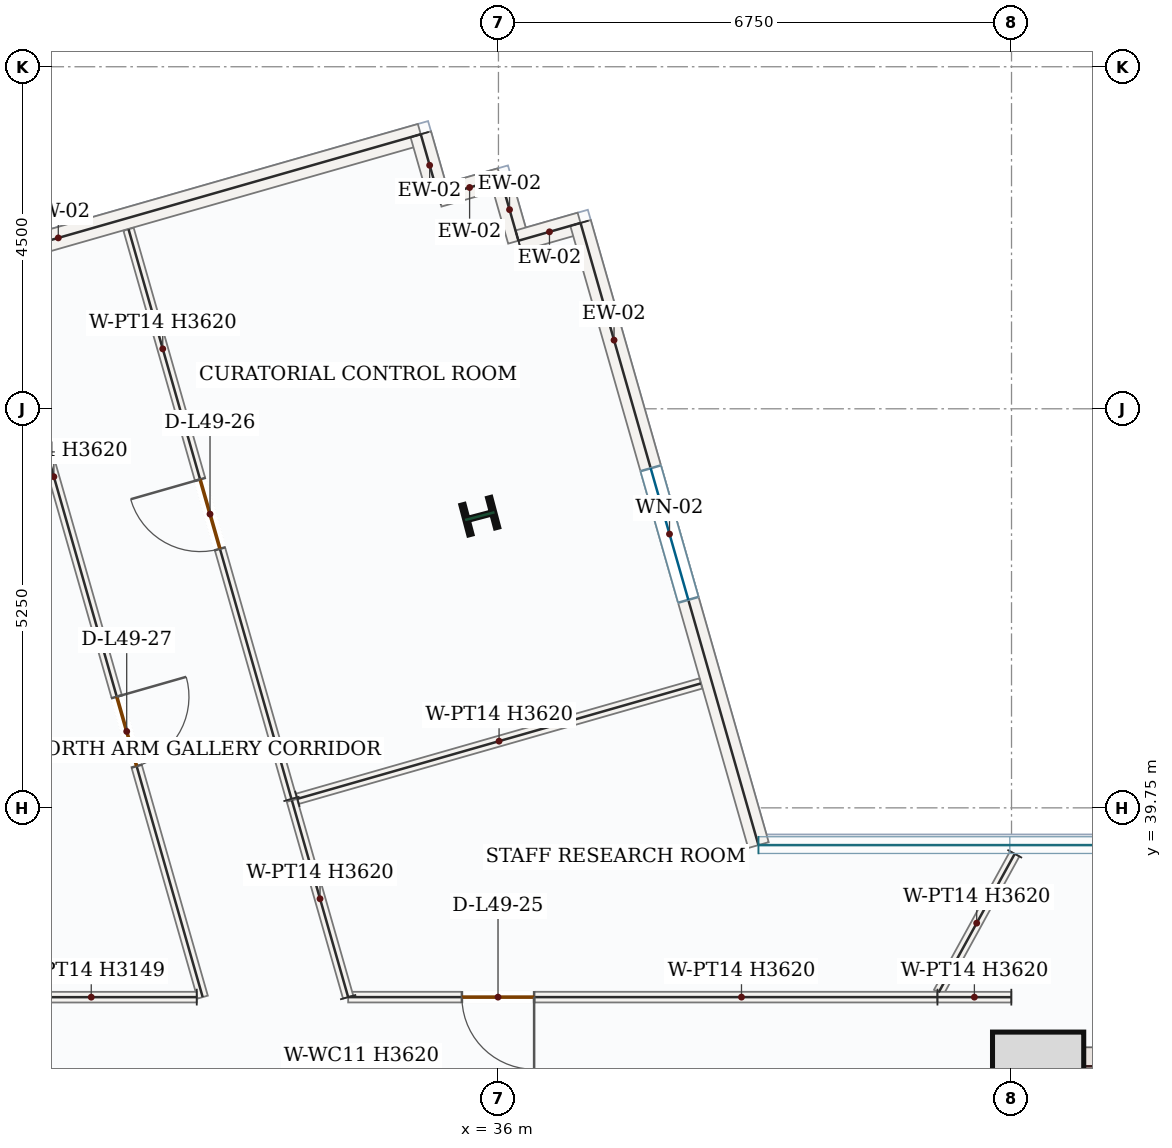
"""IFC4 building model, lengths in metres.
Left out: names, types, materials, properties, quantities, classifications, styles, units other than length and angle.
Written with IfcOpenShell. Run it as: python <this file> out.ifc"""

import sys

from ifc_helpers import new_model, si_unit, direction, frame, frame_2d, origin, origin_2d, place, context, subcontext, project, spatial, rectangle, i_section, extrude, source, transform, mapped, element, fill, save


model = new_model("IFC4")
c1 = context("Model", 3, precision=1e-05, world=origin(), true_north=direction((0.0, 1.0)))
c2 = subcontext(c1, "Body", "Model", "MODEL_VIEW")
j1 = project(units=[si_unit("LENGTHUNIT", "METRE"), si_unit("PLANEANGLEUNIT", "RADIAN")], contexts=[c1])
p1 = place(None, origin())
s1 = spatial("IfcSite", under=j1, at=p1, CompositionType="ELEMENT")
p2 = place(p1, origin())
s2 = spatial("IfcBuilding", under=s1, at=p2, CompositionType="ELEMENT")
p3 = place(p2, frame((0.0, 0.0, 209.7)))
s3 = spatial("IfcBuildingStorey", under=s2, at=p3, CompositionType="ELEMENT", Elevation=209.7)
p4 = place(p3, frame((43.0, 28.05, 0.0), z_axis=(0.0, 0.0, 1.0), x_axis=(0.0, 1.0, 0.0)))
e1 = element("IfcWall", 1, at=p4, inside=s3, PredefinedType="SHEAR", context=c2, shape_type="SweptSolid", body=[
    extrude(rectangle(XDim=8.55, YDim=0.5, at=frame_2d((4.275, 0.0))), origin(), (0.0, 0.0, 1.0), 3.62),
])
p5 = place(p4, frame((1.5, 0.0, 0.0)))
e2 = element("IfcOpeningElement", 2, at=p5, cuts=e1, PredefinedType="OPENING", context=c2, shape_type="SweptSolid", body=[
    extrude(rectangle(XDim=1.1, YDim=2.2, at=frame_2d((0.55, 1.1))), frame((0.0, 0.26, 0.0), z_axis=(0.0, -1.0, 0.0), x_axis=(1.0, 0.0, 0.0)), (0.0, 0.0, 1.0), 0.52),
])
m1 = source(origin(), c2, "Body", "SweptSolid", [
    extrude(rectangle(XDim=7.0, YDim=0.5, at=frame_2d((3.5, 0.0))), origin(), (0.0, 0.0, 1.0), 3.62),
])
p6 = place(p3, frame((43.25, 36.35, 0.0), z_axis=(0.0, 0.0, 1.0), x_axis=(1.0, 0.0, 0.0)))
e3 = element("IfcWall", 3, at=p6, inside=s3, PredefinedType="SHEAR", context=c2, shape_type="MappedRepresentation", body=[
    mapped(m1, transform((0.0, 0.0, 0.0), x_axis=(1.0, 0.0, 0.0), y_axis=(0.0, 1.0, 0.0), z_axis=(0.0, 0.0, 1.0), scale=1.0)),
])
m2 = source(origin(), c2, "Body", "SweptSolid", [
    extrude(rectangle(XDim=1.2, YDim=1.2, at=origin_2d()), origin(), (0.0, 0.0, 1.0), 3.9),
])
p7 = place(p3, frame((43.1, 36.2, 0.0), z_axis=(0.0, 0.0, 1.0), x_axis=(1.0, 0.0, 0.0)))
e4 = element("IfcColumn", 4, at=p7, inside=s3, PredefinedType="COLUMN", context=c2, shape_type="MappedRepresentation", body=[
    mapped(m2, transform((0.0, 0.0, 0.0), x_axis=(1.0, 0.0, 0.0), y_axis=(0.0, 1.0, 0.0), z_axis=(0.0, 0.0, 1.0), scale=1.0)),
])
m3 = source(origin(), c2, "Body", "SweptSolid", [
    extrude(i_section(OverallWidth=0.404, OverallDepth=0.407, WebThickness=0.027, FlangeThickness=0.044, FilletRadius=0.018, at=origin_2d()), origin(), (0.0, 0.0, 1.0), 3.9),
])
p8 = place(p3, frame((35.755, 43.588, 0.0), z_axis=(0.0, 0.0, 1.0), x_axis=(-0.255445757936, 0.966823388604, 0.0)))
e5 = element("IfcColumn", 5, at=p8, inside=s3, PredefinedType="COLUMN", context=c2, shape_type="MappedRepresentation", body=[
    mapped(m3, transform((0.0, 0.0, 0.0), x_axis=(1.0, 0.0, 0.0), y_axis=(0.0, 1.0, 0.0), z_axis=(0.0, 0.0, 1.0), scale=1.0)),
])
m4 = source(origin(), c2, "Body", "SweptSolid", [
    extrude(rectangle(XDim=9.92, YDim=0.28, at=frame_2d((4.96, 0.0))), origin(), (0.0, 0.0, 1.0), 3.62),
])
p9 = place(p3, frame((25.44, 45.885, 0.0), z_axis=(0.0, 0.0, 1.0), x_axis=(0.961457051276, 0.274955157346, 0.0)))
e6 = element("IfcWall", 6, at=p9, inside=s3, PredefinedType="SOLIDWALL", context=c2, shape_type="MappedRepresentation", body=[
    mapped(m4, transform((0.0, 0.0, 0.0), x_axis=(1.0, 0.0, 0.0), y_axis=(0.0, 1.0, 0.0), z_axis=(0.0, 0.0, 1.0), scale=1.0)),
])
m5 = source(origin(), c2, "Body", "SweptSolid", [
    extrude(rectangle(XDim=0.85, YDim=0.28, at=frame_2d((0.425, 0.0))), origin(), (0.0, 0.0, 1.0), 3.62),
])
for number, where, z_axis, x_axis in (
    (7, (34.978, 48.612, 0.0), (0.0, 0.0, 1.0), (0.275, -0.961, 0.0)),
    (8, (35.212, 47.795, 0.0), (0.0, 0.0, 1.0), (0.961, 0.275, 0.0)),
):
    element("IfcWall", number, at=place(p3, frame(where, z_axis=z_axis, x_axis=x_axis)), inside=s3, PredefinedType="SOLIDWALL", context=c2, shape_type="MappedRepresentation", body=[
        mapped(m5, transform((0.0, 0.0, 0.0), x_axis=(1.0, 0.0, 0.0), y_axis=(0.0, 1.0, 0.0), z_axis=(0.0, 0.0, 1.0), scale=1.0)),
    ])
m6 = source(origin(), c2, "Body", "SweptSolid", [
    extrude(rectangle(XDim=0.85, YDim=0.28, at=frame_2d((0.425, 0.0))), origin(), (0.0, 0.0, 1.0), 3.62),
])
p10 = place(p3, frame((36.029, 48.029, 0.0), z_axis=(0.0, 0.0, 1.0), x_axis=(0.274834915789, -0.961491429532, 0.0)))
e9 = element("IfcWall", 9, at=p10, inside=s3, PredefinedType="SOLIDWALL", context=c2, shape_type="MappedRepresentation", body=[
    mapped(m6, transform((0.0, 0.0, 0.0), x_axis=(1.0, 0.0, 0.0), y_axis=(0.0, 1.0, 0.0), z_axis=(0.0, 0.0, 1.0), scale=1.0)),
])
p11 = place(p3, frame((36.263, 47.211, 0.0), z_axis=(0.0, 0.0, 1.0), x_axis=(0.961393768724, 0.275176346112, 0.0)))
e10 = element("IfcWall", 10, at=p11, inside=s3, PredefinedType="SOLIDWALL", context=c2, shape_type="MappedRepresentation", body=[
    mapped(m5, transform((0.0, 0.0, 0.0), x_axis=(1.0, 0.0, 0.0), y_axis=(0.0, 1.0, 0.0), z_axis=(0.0, 0.0, 1.0), scale=1.0)),
])
p12 = place(p3, frame((37.08, 47.445, 0.0), z_axis=(0.0, 0.0, 1.0), x_axis=(0.27496352843, -0.961454657295, 0.0)))
e11 = element("IfcWall", 11, at=p12, inside=s3, PredefinedType="SOLIDWALL", context=c2, shape_type="SweptSolid", body=[
    extrude(rectangle(XDim=8.513, YDim=0.28, at=frame_2d((4.257, 0.0))), origin(), (0.0, 0.0, 1.0), 3.62),
])
p13 = place(p12, frame((3.357, 0.0, 0.85)))
e12 = element("IfcOpeningElement", 12, at=p13, cuts=e11, PredefinedType="OPENING", context=c2, shape_type="SweptSolid", body=[
    extrude(rectangle(XDim=1.8, YDim=1.75, at=frame_2d((0.9, 0.875))), frame((0.0, 0.15, 0.0), z_axis=(0.0, -1.0, 0.0), x_axis=(1.0, 0.0, 0.0)), (0.0, 0.0, 1.0), 0.3),
])
p14 = place(p3, frame((41.775, 37.26, 0.0), z_axis=(0.0, 0.0, 1.0), x_axis=(-1.0, 0.0, 0.0)))
e13 = element("IfcWall", 13, at=p14, inside=s3, PredefinedType="PARTITIONING", context=c2, shape_type="SweptSolid", body=[
    extrude(rectangle(XDim=7.753, YDim=0.14, at=frame_2d((3.876, 0.0))), origin(), (0.0, 0.0, 1.0), 3.62),
])
p15 = place(p14, frame((5.306, 0.0, 0.0)))
e14 = element("IfcOpeningElement", 14, at=p15, cuts=e13, PredefinedType="OPENING", context=c2, shape_type="SweptSolid", body=[
    extrude(rectangle(XDim=0.95, YDim=2.15, at=frame_2d((0.475, 1.075))), frame((0.0, 0.08, 0.0), z_axis=(0.0, -1.0, 0.0), x_axis=(1.0, 0.0, 0.0)), (0.0, 0.0, 1.0), 0.16),
])
m7 = source(origin(), c2, "Body", "SweptSolid", [
    extrude(rectangle(XDim=2.692, YDim=0.14, at=frame_2d((1.346, 0.0))), origin(), (0.0, 0.0, 1.0), 3.62),
])
p16 = place(p3, frame((34.023, 37.26, 0.0), z_axis=(0.0, 0.0, 1.0), x_axis=(-0.27500862401, 0.961441759401, 0.0)))
e15 = element("IfcWall", 15, at=p16, inside=s3, PredefinedType="PARTITIONING", context=c2, shape_type="MappedRepresentation", body=[
    mapped(m7, transform((0.0, 0.0, 0.0), x_axis=(1.0, 0.0, 0.0), y_axis=(0.0, 1.0, 0.0), z_axis=(0.0, 0.0, 1.0), scale=1.0)),
])
m8 = source(origin(), c2, "Body", "SweptSolid", [
    extrude(rectangle(XDim=5.52, YDim=0.14, at=frame_2d((2.76, 0.0))), origin(), (0.0, 0.0, 1.0), 3.62),
])
p17 = place(p3, frame((33.354, 39.869, 0.0), z_axis=(0.0, 0.0, 1.0), x_axis=(0.961455490798, 0.274960613933, 0.0)))
e16 = element("IfcWall", 16, at=p17, inside=s3, PredefinedType="PARTITIONING", context=c2, shape_type="MappedRepresentation", body=[
    mapped(m8, transform((0.0, 0.0, 0.0), x_axis=(1.0, 0.0, 0.0), y_axis=(0.0, 1.0, 0.0), z_axis=(0.0, 0.0, 1.0), scale=1.0)),
])
m9 = source(origin(), c2, "Body", "SweptSolid", [
    extrude(rectangle(XDim=2.08, YDim=0.14, at=frame_2d((1.04, 0.0))), origin(), (0.0, 0.0, 1.0), 3.62),
])
p18 = place(p3, frame((42.792, 39.145, 0.0), z_axis=(0.0, 0.0, 1.0), x_axis=(-0.481301259497, -0.87655524504, 0.0)))
e17 = element("IfcWall", 17, at=p18, inside=s3, PredefinedType="PARTITIONING", context=c2, shape_type="MappedRepresentation", body=[
    mapped(m9, transform((0.0, 0.0, 0.0), x_axis=(1.0, 0.0, 0.0), y_axis=(0.0, 1.0, 0.0), z_axis=(0.0, 0.0, 1.0), scale=1.0)),
])
p19 = place(p3, frame((33.277, 39.867, 0.0), z_axis=(0.0, 0.0, 1.0), x_axis=(-0.274985856522, 0.96144827147, 0.0)))
e18 = element("IfcWall", 18, at=p19, inside=s3, PredefinedType="PARTITIONING", context=c2, shape_type="SweptSolid", body=[
    extrude(rectangle(XDim=7.795, YDim=0.14, at=frame_2d((3.897, 0.0))), origin(), (0.0, 0.0, 1.0), 3.62),
])
p20 = place(p19, frame((3.423, 0.0, 0.0)))
e19 = element("IfcOpeningElement", 19, at=p20, cuts=e18, PredefinedType="OPENING", context=c2, shape_type="SweptSolid", body=[
    extrude(rectangle(XDim=0.95, YDim=2.15, at=frame_2d((0.475, 1.075))), frame((0.0, 0.08, 0.0), z_axis=(0.0, -1.0, 0.0), x_axis=(1.0, 0.0, 0.0)), (0.0, 0.0, 1.0), 0.16),
])
m10 = source(origin(), c2, "Body", "SweptSolid", [
    extrude(rectangle(XDim=0.972, YDim=0.14, at=frame_2d((0.486, 0.0))), origin(), (0.0, 0.0, 1.0), 3.62),
])
p21 = place(p3, frame((42.748, 37.259, 0.0), z_axis=(0.0, 0.0, 1.0), x_axis=(-0.999999716202, 0.000753390042, 0.0)))
e20 = element("IfcWall", 20, at=p21, inside=s3, PredefinedType="PARTITIONING", context=c2, shape_type="MappedRepresentation", body=[
    mapped(m10, transform((0.0, 0.0, 0.0), x_axis=(1.0, 0.0, 0.0), y_axis=(0.0, 1.0, 0.0), z_axis=(0.0, 0.0, 1.0), scale=1.0)),
])
p22 = place(p3, frame((29.365, 46.856, 0.0), z_axis=(0.0, 0.0, 1.0), x_axis=(0.274969885882, -0.961452839123, 0.0)))
e21 = element("IfcWall", 21, at=p22, inside=s3, PredefinedType="PARTITIONING", context=c2, shape_type="SweptSolid", body=[
    extrude(rectangle(XDim=9.981, YDim=0.14, at=frame_2d((4.99, 0.0))), origin(), (0.0, 0.0, 1.0), 3.62),
])
p23 = place(p22, frame((5.87, 0.0, 0.0)))
e22 = element("IfcOpeningElement", 22, at=p23, cuts=e21, PredefinedType="OPENING", context=c2, shape_type="SweptSolid", body=[
    extrude(rectangle(XDim=0.95, YDim=2.15, at=frame_2d((0.475, 1.075))), frame((0.0, 0.08, 0.0), z_axis=(0.0, -1.0, 0.0), x_axis=(1.0, 0.0, 0.0)), (0.0, 0.0, 1.0), 0.16),
])
m11 = source(origin(), c2, "Body", "SweptSolid", [
    extrude(rectangle(XDim=2.776, YDim=0.14, at=frame_2d((1.388, 0.0))), origin(), (0.0, 0.0, 1.0), 3.149),
])
p24 = place(p3, frame((32.031, 37.26, 0.0), z_axis=(0.0, 0.0, 1.0), x_axis=(-0.999999903325, -0.000439715022, 0.0)))
e23 = element("IfcWall", 23, at=p24, inside=s3, PredefinedType="PARTITIONING", context=c2, shape_type="MappedRepresentation", body=[
    mapped(m11, transform((0.0, 0.0, 0.0), x_axis=(1.0, 0.0, 0.0), y_axis=(0.0, 1.0, 0.0), z_axis=(0.0, 0.0, 1.0), scale=1.0)),
])
m12 = source(origin(), c2, "Body", "SweptSolid", [
    extrude(rectangle(XDim=1.8, YDim=1.75, at=frame_2d((0.9, 0.875))), frame((0.0, 0.03, 0.0), z_axis=(0.0, -1.0, 0.0), x_axis=(1.0, 0.0, 0.0)), (0.0, 0.0, 1.0), 0.06),
])
p25 = place(p13, origin())
e24 = element("IfcWindow", 24, at=p25, inside=s3, PartitioningType="DOUBLE_PANEL_VERTICAL", PredefinedType="WINDOW", context=c2, shape_type="MappedRepresentation", body=[
    mapped(m12, transform((0.0, 0.0, 0.0), x_axis=(1.0, 0.0, 0.0), y_axis=(0.0, 1.0, 0.0), z_axis=(0.0, 0.0, 1.0), scale=1.0)),
])
fill(e12, e24)
m13 = source(origin(), c2, "Body", "SweptSolid", [
    extrude(rectangle(XDim=0.95, YDim=2.15, at=frame_2d((0.475, 1.075))), frame((0.0, 0.025, 0.0), z_axis=(0.0, -1.0, 0.0), x_axis=(1.0, 0.0, 0.0)), (0.0, 0.0, 1.0), 0.05),
])
p26 = place(p15, origin())
e25 = element("IfcDoor", 25, at=p26, inside=s3, OperationType="SINGLE_SWING_LEFT", PredefinedType="DOOR", context=c2, shape_type="MappedRepresentation", body=[
    mapped(m13, transform((0.0, 0.0, 0.0), x_axis=(1.0, 0.0, 0.0), y_axis=(0.0, 1.0, 0.0), z_axis=(0.0, 0.0, 1.0), scale=1.0)),
])
fill(e14, e25)
p27 = place(p20, origin())
e26 = element("IfcDoor", 26, at=p27, inside=s3, OperationType="SINGLE_SWING_RIGHT", PredefinedType="DOOR", context=c2, shape_type="MappedRepresentation", body=[
    mapped(m13, transform((0.0, 0.0, 0.0), x_axis=(1.0, 0.0, 0.0), y_axis=(0.0, 1.0, 0.0), z_axis=(0.0, 0.0, 1.0), scale=1.0)),
])
fill(e19, e26)
p28 = place(p23, origin())
e27 = element("IfcDoor", 27, at=p28, inside=s3, OperationType="SINGLE_SWING_LEFT", PredefinedType="DOOR", context=c2, shape_type="MappedRepresentation", body=[
    mapped(m13, transform((0.0, 0.0, 0.0), x_axis=(1.0, 0.0, 0.0), y_axis=(0.0, 1.0, 0.0), z_axis=(0.0, 0.0, 1.0), scale=1.0)),
])
fill(e22, e27)
save(model, sys.argv[1])
